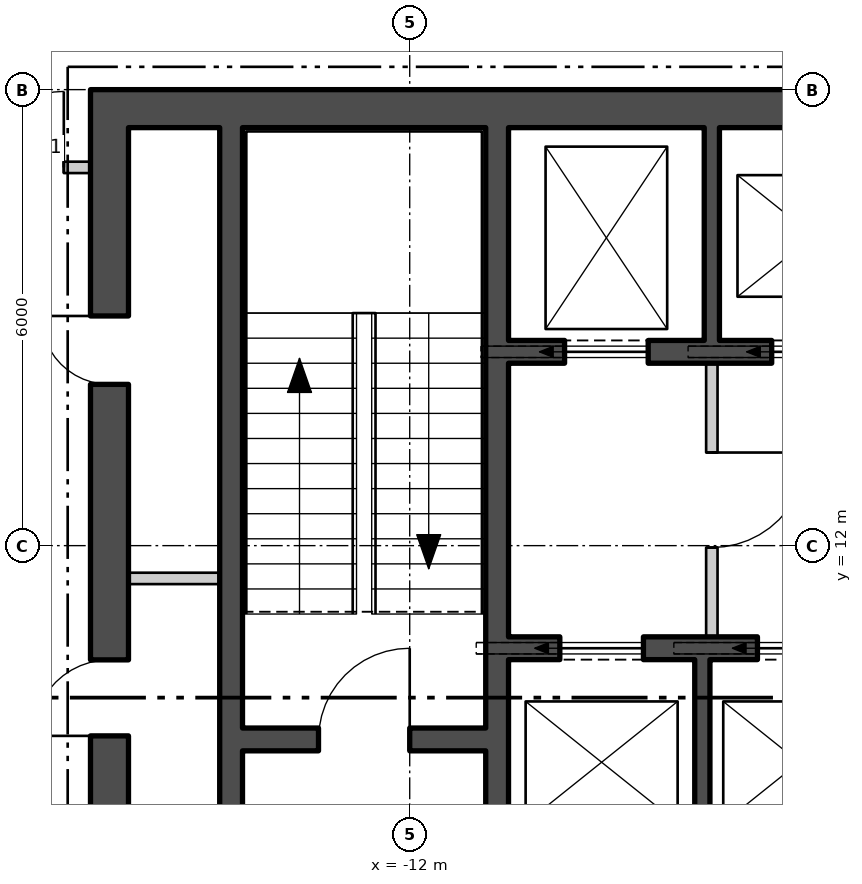
"""IFC4 building model, lengths in metres.
Left out: names, types, materials, properties, quantities, classifications, styles, units other than length and angle.
Written with IfcOpenShell. Run it as: python <this file> out.ifc"""

import sys

from ifc_helpers import new_model, si_unit, direction, frame, frame_2d, origin, place, context, subcontext, project, spatial, polyline, rectangle, outline, extrude, element, fill, save


model = new_model("IFC4")
c1 = context("Model", 3, precision=1e-05, world=origin(), true_north=direction((0.0, 1.0)))
c2 = subcontext(c1, "Body", "Model", "MODEL_VIEW")
j1 = project(units=[si_unit("LENGTHUNIT", "METRE"), si_unit("PLANEANGLEUNIT", "RADIAN")], contexts=[c1])
p1 = place(None, origin())
s1 = spatial("IfcSite", under=j1, at=p1, CompositionType="ELEMENT")
p2 = place(p1, origin())
s2 = spatial("IfcBuilding", under=s1, at=p2, CompositionType="ELEMENT")
p3 = place(p2, frame((0.0, 0.0, 151.5)))
s3 = spatial("IfcBuildingStorey", under=s2, at=p3, CompositionType="ELEMENT", Elevation=151.5)
p4 = place(p3, frame((-27.075, 12.683, -0.18), z_axis=(0.0, 0.0, 1.0), x_axis=(0.500000141277, -0.866025322218, 0.0)))
e1 = element("IfcWall", 1, at=p4, inside=s3, PredefinedType="SOLIDWALL", context=c2, shape_type="SweptSolid", body=[
    extrude(outline(polyline([(-0.13, -0.225), (45.86, -0.225), (45.6, 0.225), (0.13, 0.225), (-0.13, -0.225)])), origin(), (0.0, 0.0, 1.0), 3.68),
])
p5 = place(p4, frame((1.424, 0.0, 1.08)))
e2 = element("IfcOpeningElement", 2, at=p5, cuts=e1, PredefinedType="OPENING", context=c2, shape_type="SweptSolid", body=[
    extrude(rectangle(XDim=2.4, YDim=2.0, at=frame_2d((1.2, 1.0))), frame((0.0, 0.235, 0.0), z_axis=(0.0, -1.0, 0.0), x_axis=(1.0, 0.0, 0.0)), (0.0, 0.0, 1.0), 0.47),
])
p6 = place(p4, frame((5.892, 0.0, 1.08)))
e3 = element("IfcOpeningElement", 3, at=p6, cuts=e1, PredefinedType="OPENING", context=c2, shape_type="SweptSolid", body=[
    extrude(rectangle(XDim=2.4, YDim=2.0, at=frame_2d((1.2, 1.0))), frame((0.0, 0.235, 0.0), z_axis=(0.0, -1.0, 0.0), x_axis=(1.0, 0.0, 0.0)), (0.0, 0.0, 1.0), 0.47),
])
p7 = place(p4, frame((10.399, 0.0, 1.08)))
e4 = element("IfcOpeningElement", 4, at=p7, cuts=e1, PredefinedType="OPENING", context=c2, shape_type="SweptSolid", body=[
    extrude(rectangle(XDim=2.4, YDim=2.0, at=frame_2d((1.2, 1.0))), frame((0.0, 0.235, 0.0), z_axis=(0.0, -1.0, 0.0), x_axis=(1.0, 0.0, 0.0)), (0.0, 0.0, 1.0), 0.47),
])
p8 = place(p4, frame((14.905, 0.0, 1.08)))
e5 = element("IfcOpeningElement", 5, at=p8, cuts=e1, PredefinedType="OPENING", context=c2, shape_type="SweptSolid", body=[
    extrude(rectangle(XDim=2.4, YDim=2.0, at=frame_2d((1.2, 1.0))), frame((0.0, 0.235, 0.0), z_axis=(0.0, -1.0, 0.0), x_axis=(1.0, 0.0, 0.0)), (0.0, 0.0, 1.0), 0.47),
])
p9 = place(p4, frame((19.412, 0.0, 1.08)))
e6 = element("IfcOpeningElement", 6, at=p9, cuts=e1, PredefinedType="OPENING", context=c2, shape_type="SweptSolid", body=[
    extrude(rectangle(XDim=2.4, YDim=2.0, at=frame_2d((1.2, 1.0))), frame((0.0, 0.235, 0.0), z_axis=(0.0, -1.0, 0.0), x_axis=(1.0, 0.0, 0.0)), (0.0, 0.0, 1.0), 0.47),
])
p10 = place(p4, frame((23.918, 0.0, 1.08)))
e7 = element("IfcOpeningElement", 7, at=p10, cuts=e1, PredefinedType="OPENING", context=c2, shape_type="SweptSolid", body=[
    extrude(rectangle(XDim=2.4, YDim=2.0, at=frame_2d((1.2, 1.0))), frame((0.0, 0.235, 0.0), z_axis=(0.0, -1.0, 0.0), x_axis=(1.0, 0.0, 0.0)), (0.0, 0.0, 1.0), 0.47),
])
p11 = place(p4, frame((28.425, 0.0, 1.08)))
e8 = element("IfcOpeningElement", 8, at=p11, cuts=e1, PredefinedType="OPENING", context=c2, shape_type="SweptSolid", body=[
    extrude(rectangle(XDim=2.4, YDim=2.0, at=frame_2d((1.2, 1.0))), frame((0.0, 0.235, 0.0), z_axis=(0.0, -1.0, 0.0), x_axis=(1.0, 0.0, 0.0)), (0.0, 0.0, 1.0), 0.47),
])
p12 = place(p4, frame((32.932, 0.0, 1.08)))
e9 = element("IfcOpeningElement", 9, at=p12, cuts=e1, PredefinedType="OPENING", context=c2, shape_type="SweptSolid", body=[
    extrude(rectangle(XDim=2.4, YDim=2.0, at=frame_2d((1.2, 1.0))), frame((0.0, 0.235, 0.0), z_axis=(0.0, -1.0, 0.0), x_axis=(1.0, 0.0, 0.0)), (0.0, 0.0, 1.0), 0.47),
])
p13 = place(p4, frame((37.438, 0.0, 1.08)))
e10 = element("IfcOpeningElement", 10, at=p13, cuts=e1, PredefinedType="OPENING", context=c2, shape_type="SweptSolid", body=[
    extrude(rectangle(XDim=2.4, YDim=2.0, at=frame_2d((1.2, 1.0))), frame((0.0, 0.235, 0.0), z_axis=(0.0, -1.0, 0.0), x_axis=(1.0, 0.0, 0.0)), (0.0, 0.0, 1.0), 0.47),
])
p14 = place(p4, frame((41.907, 0.0, 1.08)))
e11 = element("IfcOpeningElement", 11, at=p14, cuts=e1, PredefinedType="OPENING", context=c2, shape_type="SweptSolid", body=[
    extrude(rectangle(XDim=2.4, YDim=2.0, at=frame_2d((1.2, 1.0))), frame((0.0, 0.235, 0.0), z_axis=(0.0, -1.0, 0.0), x_axis=(1.0, 0.0, 0.0)), (0.0, 0.0, 1.0), 0.47),
])
p15 = place(p3, frame((-16.2, 17.75, 0.0), z_axis=(0.0, 0.0, 1.0), x_axis=(1.0, 0.0, 0.0)))
e12 = element("IfcWall", 12, at=p15, inside=s3, PredefinedType="SHEAR", context=c2, shape_type="SweptSolid", body=[
    extrude(rectangle(XDim=32.4, YDim=0.5, at=frame_2d((16.2, 0.0))), origin(), (0.0, 0.0, 1.0), 3.7),
])
p16 = place(p3, frame((-15.95, 2.5, 0.0), z_axis=(0.0, 0.0, 1.0), x_axis=(0.0, 1.0, 0.0)))
e13 = element("IfcWall", 13, at=p16, inside=s3, PredefinedType="SHEAR", context=c2, shape_type="SweptSolid", body=[
    extrude(rectangle(XDim=15.0, YDim=0.5, at=frame_2d((7.5, 0.0))), origin(), (0.0, 0.0, 1.0), 3.7),
])
p17 = place(p16, frame((4.35, 0.0, 0.0)))
e14 = element("IfcOpeningElement", 14, at=p17, cuts=e13, PredefinedType="OPENING", context=c2, shape_type="SweptSolid", body=[
    extrude(rectangle(XDim=1.5, YDim=2.1, at=frame_2d((0.75, 1.05))), frame((0.0, 0.26, 0.0), z_axis=(0.0, -1.0, 0.0), x_axis=(1.0, 0.0, 0.0)), (0.0, 0.0, 1.0), 0.52),
])
p18 = place(p16, frame((0.825, 0.0, 0.0)))
e15 = element("IfcOpeningElement", 15, at=p18, cuts=e13, PredefinedType="OPENING", context=c2, shape_type="SweptSolid", body=[
    extrude(rectangle(XDim=0.9, YDim=2.1, at=frame_2d((0.45, 1.05))), frame((0.0, 0.26, 0.0), z_axis=(0.0, -1.0, 0.0), x_axis=(1.0, 0.0, 0.0)), (0.0, 0.0, 1.0), 0.52),
])
p19 = place(p16, frame((3.0, 0.0, 0.0)))
e16 = element("IfcOpeningElement", 16, at=p19, cuts=e13, PredefinedType="OPENING", context=c2, shape_type="SweptSolid", body=[
    extrude(rectangle(XDim=0.9, YDim=2.1, at=frame_2d((0.45, 1.05))), frame((0.0, 0.26, 0.0), z_axis=(0.0, -1.0, 0.0), x_axis=(1.0, 0.0, 0.0)), (0.0, 0.0, 1.0), 0.52),
])
p20 = place(p16, frame((6.997, 0.0, 0.0)))
e17 = element("IfcOpeningElement", 17, at=p20, cuts=e13, PredefinedType="OPENING", context=c2, shape_type="SweptSolid", body=[
    extrude(rectangle(XDim=1.0, YDim=2.1, at=frame_2d((0.5, 1.05))), frame((0.0, 0.26, 0.0), z_axis=(0.0, -1.0, 0.0), x_axis=(1.0, 0.0, 0.0)), (0.0, 0.0, 1.0), 0.52),
])
p21 = place(p16, frame((11.622, 0.0, 0.0)))
e18 = element("IfcOpeningElement", 18, at=p21, cuts=e13, PredefinedType="OPENING", context=c2, shape_type="SweptSolid", body=[
    extrude(rectangle(XDim=0.9, YDim=2.1, at=frame_2d((0.45, 1.05))), frame((0.0, 0.26, 0.0), z_axis=(0.0, -1.0, 0.0), x_axis=(1.0, 0.0, 0.0)), (0.0, 0.0, 1.0), 0.52),
])
p22 = place(p3, frame((-10.85, 2.5, 0.0), z_axis=(0.0, 0.0, 1.0), x_axis=(0.0, 1.0, 0.0)))
e19 = element("IfcWall", 19, at=p22, inside=s3, PredefinedType="SHEAR", context=c2, shape_type="SweptSolid", body=[
    extrude(rectangle(XDim=15.0, YDim=0.3, at=frame_2d((7.5, 0.0))), origin(), (0.0, 0.0, 1.0), 3.7),
])
p23 = place(p22, frame((3.475, 0.0, 0.0)))
e20 = element("IfcOpeningElement", 20, at=p23, cuts=e19, PredefinedType="OPENING", context=c2, shape_type="SweptSolid", body=[
    extrude(rectangle(XDim=1.25, YDim=2.1, at=frame_2d((0.625, 1.05))), frame((0.0, 0.16, 0.0), z_axis=(0.0, -1.0, 0.0), x_axis=(1.0, 0.0, 0.0)), (0.0, 0.0, 1.0), 0.32),
])
p24 = place(p22, frame((1.125, 0.0, 0.0)))
e21 = element("IfcOpeningElement", 21, at=p24, cuts=e19, PredefinedType="OPENING", context=c2, shape_type="SweptSolid", body=[
    extrude(rectangle(XDim=1.0, YDim=2.1, at=frame_2d((0.5, 1.05))), frame((0.0, 0.16, 0.0), z_axis=(0.0, -1.0, 0.0), x_axis=(1.0, 0.0, 0.0)), (0.0, 0.0, 1.0), 0.32),
])
p25 = place(p3, frame((-14.35, 2.5, 0.0), z_axis=(0.0, 0.0, 1.0), x_axis=(0.0, 1.0, 0.0)))
e22 = element("IfcWall", 22, at=p25, inside=s3, PredefinedType="SHEAR", context=c2, shape_type="SweptSolid", body=[
    extrude(rectangle(XDim=15.0, YDim=0.3, at=frame_2d((7.5, 0.0))), origin(), (0.0, 0.0, 1.0), 3.7),
])
p26 = place(p25, frame((4.35, 0.0, 0.0)))
e23 = element("IfcOpeningElement", 23, at=p26, cuts=e22, PredefinedType="OPENING", context=c2, shape_type="SweptSolid", body=[
    extrude(rectangle(XDim=1.5, YDim=2.1, at=frame_2d((0.75, 1.05))), frame((0.0, 0.16, 0.0), z_axis=(0.0, -1.0, 0.0), x_axis=(1.0, 0.0, 0.0)), (0.0, 0.0, 1.0), 0.32),
])
p27 = place(p3, frame((-14.2, 9.45, 0.0), z_axis=(0.0, 0.0, 1.0), x_axis=(1.0, 0.0, 0.0)))
e24 = element("IfcWall", 24, at=p27, inside=s3, PredefinedType="SHEAR", context=c2, shape_type="SweptSolid", body=[
    extrude(rectangle(XDim=3.2, YDim=0.3, at=frame_2d((1.6, 0.0))), origin(), (0.0, 0.0, 1.0), 3.7),
])
p28 = place(p27, frame((1.0, 0.0, 0.0)))
e25 = element("IfcOpeningElement", 25, at=p28, cuts=e24, PredefinedType="OPENING", context=c2, shape_type="SweptSolid", body=[
    extrude(rectangle(XDim=1.2, YDim=2.1, at=frame_2d((0.6, 1.05))), frame((0.0, 0.16, 0.0), z_axis=(0.0, -1.0, 0.0), x_axis=(1.0, 0.0, 0.0)), (0.0, 0.0, 1.0), 0.32),
])
p29 = place(p3, frame((-10.7, 14.55, 0.0), z_axis=(0.0, 0.0, 1.0), x_axis=(1.0, 0.0, 0.0)))
e26 = element("IfcWall", 26, at=p29, inside=s3, PredefinedType="SHEAR", context=c2, shape_type="SweptSolid", body=[
    extrude(rectangle(XDim=21.4, YDim=0.3, at=frame_2d((10.7, 0.0))), origin(), (0.0, 0.0, 1.0), 3.7),
])
p30 = place(p29, frame((0.738, 0.0, 0.0)))
e27 = element("IfcOpeningElement", 27, at=p30, cuts=e26, PredefinedType="OPENING", context=c2, shape_type="SweptSolid", body=[
    extrude(rectangle(XDim=1.1, YDim=2.1, at=frame_2d((0.55, 1.05))), frame((0.0, 0.16, 0.0), z_axis=(0.0, -1.0, 0.0), x_axis=(1.0, 0.0, 0.0)), (0.0, 0.0, 1.0), 0.32),
])
p31 = place(p29, frame((3.462, 0.0, 0.0)))
e28 = element("IfcOpeningElement", 28, at=p31, cuts=e26, PredefinedType="OPENING", context=c2, shape_type="SweptSolid", body=[
    extrude(rectangle(XDim=1.1, YDim=2.1, at=frame_2d((0.55, 1.05))), frame((0.0, 0.16, 0.0), z_axis=(0.0, -1.0, 0.0), x_axis=(1.0, 0.0, 0.0)), (0.0, 0.0, 1.0), 0.32),
])
p32 = place(p29, frame((6.138, 0.0, 0.0)))
e29 = element("IfcOpeningElement", 29, at=p32, cuts=e26, PredefinedType="OPENING", context=c2, shape_type="SweptSolid", body=[
    extrude(rectangle(XDim=1.1, YDim=2.1, at=frame_2d((0.55, 1.05))), frame((0.0, 0.16, 0.0), z_axis=(0.0, -1.0, 0.0), x_axis=(1.0, 0.0, 0.0)), (0.0, 0.0, 1.0), 0.32),
])
p33 = place(p29, frame((8.812, 0.0, 0.0)))
e30 = element("IfcOpeningElement", 30, at=p33, cuts=e26, PredefinedType="OPENING", context=c2, shape_type="SweptSolid", body=[
    extrude(rectangle(XDim=1.1, YDim=2.1, at=frame_2d((0.55, 1.05))), frame((0.0, 0.16, 0.0), z_axis=(0.0, -1.0, 0.0), x_axis=(1.0, 0.0, 0.0)), (0.0, 0.0, 1.0), 0.32),
])
p34 = place(p29, frame((19.562, 0.0, 0.0)))
e31 = element("IfcOpeningElement", 31, at=p34, cuts=e26, PredefinedType="OPENING", context=c2, shape_type="SweptSolid", body=[
    extrude(rectangle(XDim=1.1, YDim=2.1, at=frame_2d((0.55, 1.05))), frame((0.0, 0.16, 0.0), z_axis=(0.0, -1.0, 0.0), x_axis=(1.0, 0.0, 0.0)), (0.0, 0.0, 1.0), 0.32),
])
p35 = place(p29, frame((14.213, 0.0, 0.0)))
e32 = element("IfcOpeningElement", 32, at=p35, cuts=e26, PredefinedType="OPENING", context=c2, shape_type="SweptSolid", body=[
    extrude(rectangle(XDim=1.0, YDim=2.1, at=frame_2d((0.5, 1.05))), frame((0.0, 0.16, 0.0), z_axis=(0.0, -1.0, 0.0), x_axis=(1.0, 0.0, 0.0)), (0.0, 0.0, 1.0), 0.32),
])
p36 = place(p3, frame((-10.7, 10.65, 0.0), z_axis=(0.0, 0.0, 1.0), x_axis=(1.0, 0.0, 0.0)))
e33 = element("IfcWall", 33, at=p36, inside=s3, PredefinedType="SHEAR", context=c2, shape_type="SweptSolid", body=[
    extrude(rectangle(XDim=10.3, YDim=0.3, at=frame_2d((5.15, 0.0))), origin(), (0.0, 0.0, 1.0), 3.7),
])
p37 = place(p36, frame((0.675, 0.0, 0.0)))
e34 = element("IfcOpeningElement", 34, at=p37, cuts=e33, PredefinedType="OPENING", context=c2, shape_type="SweptSolid", body=[
    extrude(rectangle(XDim=1.1, YDim=2.1, at=frame_2d((0.55, 1.05))), frame((0.0, 0.16, 0.0), z_axis=(0.0, -1.0, 0.0), x_axis=(1.0, 0.0, 0.0)), (0.0, 0.0, 1.0), 0.32),
])
p38 = place(p36, frame((3.275, 0.0, 0.0)))
e35 = element("IfcOpeningElement", 35, at=p38, cuts=e33, PredefinedType="OPENING", context=c2, shape_type="SweptSolid", body=[
    extrude(rectangle(XDim=1.1, YDim=2.1, at=frame_2d((0.55, 1.05))), frame((0.0, 0.16, 0.0), z_axis=(0.0, -1.0, 0.0), x_axis=(1.0, 0.0, 0.0)), (0.0, 0.0, 1.0), 0.32),
])
p39 = place(p36, frame((5.825, 0.0, 0.0)))
e36 = element("IfcOpeningElement", 36, at=p39, cuts=e33, PredefinedType="OPENING", context=c2, shape_type="SweptSolid", body=[
    extrude(rectangle(XDim=1.1, YDim=2.1, at=frame_2d((0.55, 1.05))), frame((0.0, 0.16, 0.0), z_axis=(0.0, -1.0, 0.0), x_axis=(1.0, 0.0, 0.0)), (0.0, 0.0, 1.0), 0.32),
])
p40 = place(p36, frame((8.425, 0.0, 0.0)))
e37 = element("IfcOpeningElement", 37, at=p40, cuts=e33, PredefinedType="OPENING", context=c2, shape_type="SweptSolid", body=[
    extrude(rectangle(XDim=1.0, YDim=2.1, at=frame_2d((0.5, 1.05))), frame((0.0, 0.16, 0.0), z_axis=(0.0, -1.0, 0.0), x_axis=(1.0, 0.0, 0.0)), (0.0, 0.0, 1.0), 0.32),
])
p41 = place(p3, frame((-8.025, 14.7, 0.0), z_axis=(0.0, 0.0, 1.0), x_axis=(0.0, 1.0, 0.0)))
e38 = element("IfcWall", 38, at=p41, inside=s3, PredefinedType="SHEAR", context=c2, shape_type="SweptSolid", body=[
    extrude(rectangle(XDim=2.8, YDim=0.2, at=frame_2d((1.4, 0.0))), origin(), (0.0, 0.0, 1.0), 3.7),
])
p42 = place(p3, frame((-8.15, 7.8, 0.0), z_axis=(0.0, 0.0, 1.0), x_axis=(0.0, 1.0, 0.0)))
e39 = element("IfcWall", 39, at=p42, inside=s3, PredefinedType="SHEAR", context=c2, shape_type="SweptSolid", body=[
    extrude(rectangle(XDim=2.7, YDim=0.2, at=frame_2d((1.35, 0.0))), origin(), (0.0, 0.0, 1.0), 3.7),
])
p43 = place(p3, frame((-8.025, 10.8, 0.0), z_axis=(0.0, 0.0, 1.0), x_axis=(0.0, 1.0, 0.0)))
e40 = element("IfcWall", 40, at=p43, inside=s3, PredefinedType="PARTITIONING", context=c2, shape_type="SweptSolid", body=[
    extrude(rectangle(XDim=3.6, YDim=0.15, at=frame_2d((1.8, 0.0))), origin(), (0.0, 0.0, 1.0), 3.7),
])
p44 = place(p43, frame((1.175, 0.0, 0.0)))
e41 = element("IfcOpeningElement", 41, at=p44, cuts=e40, PredefinedType="OPENING", context=c2, shape_type="SweptSolid", body=[
    extrude(rectangle(XDim=1.25, YDim=2.1, at=frame_2d((0.625, 1.05))), frame((0.0, 0.085, 0.0), z_axis=(0.0, -1.0, 0.0), x_axis=(1.0, 0.0, 0.0)), (0.0, 0.0, 1.0), 0.17),
])
p45 = place(p3, frame((-15.7, 11.569, 0.0), z_axis=(0.0, 0.0, 1.0), x_axis=(1.0, 0.0, 0.0)))
e42 = element("IfcWall", 42, at=p45, inside=s3, PredefinedType="PARTITIONING", context=c2, shape_type="SweptSolid", body=[
    extrude(rectangle(XDim=1.2, YDim=0.15, at=frame_2d((0.6, 0.0))), origin(), (0.0, 0.0, 1.0), 3.7),
])
p46 = place(p3, frame((-17.952, 16.977, 0.0), z_axis=(0.0, 0.0, 1.0), x_axis=(1.0, 0.0, 0.0)))
e43 = element("IfcWall", 43, at=p46, inside=s3, PredefinedType="PARTITIONING", context=c2, shape_type="SweptSolid", body=[
    extrude(rectangle(XDim=1.752, YDim=0.15, at=frame_2d((0.876, 0.0))), origin(), (0.0, 0.0, 1.0), 3.7),
])
p47 = place(p46, frame((0.401, 0.0, 0.0)))
e44 = element("IfcOpeningElement", 44, at=p47, cuts=e43, PredefinedType="OPENING", context=c2, shape_type="SweptSolid", body=[
    extrude(rectangle(XDim=1.0, YDim=2.1, at=frame_2d((0.5, 1.05))), frame((0.0, 0.085, 0.0), z_axis=(0.0, -1.0, 0.0), x_axis=(1.0, 0.0, 0.0)), (0.0, 0.0, 1.0), 0.17),
])
p48 = place(p30, origin())
e45 = element("IfcDoor", 45, at=p48, inside=s3, OperationType="SLIDING_TO_LEFT", PredefinedType="DOOR", context=c2, shape_type="SweptSolid", body=[
    extrude(rectangle(XDim=1.1, YDim=2.1, at=frame_2d((0.55, 1.05))), frame((0.0, 0.025, 0.0), z_axis=(0.0, -1.0, 0.0), x_axis=(1.0, 0.0, 0.0)), (0.0, 0.0, 1.0), 0.05),
])
fill(e27, e45)
p49 = place(p31, origin())
e46 = element("IfcDoor", 46, at=p49, inside=s3, OperationType="SLIDING_TO_LEFT", PredefinedType="DOOR", context=c2, shape_type="SweptSolid", body=[
    extrude(rectangle(XDim=1.1, YDim=2.1, at=frame_2d((0.55, 1.05))), frame((0.0, 0.025, 0.0), z_axis=(0.0, -1.0, 0.0), x_axis=(1.0, 0.0, 0.0)), (0.0, 0.0, 1.0), 0.05),
])
fill(e28, e46)
p50 = place(p37, origin())
e47 = element("IfcDoor", 47, at=p50, inside=s3, OperationType="SLIDING_TO_LEFT", PredefinedType="DOOR", context=c2, shape_type="SweptSolid", body=[
    extrude(rectangle(XDim=1.1, YDim=2.1, at=frame_2d((0.55, 1.05))), frame((0.0, 0.025, 0.0), z_axis=(0.0, -1.0, 0.0), x_axis=(1.0, 0.0, 0.0)), (0.0, 0.0, 1.0), 0.05),
])
fill(e34, e47)
p51 = place(p38, origin())
e48 = element("IfcDoor", 48, at=p51, inside=s3, OperationType="SLIDING_TO_LEFT", PredefinedType="DOOR", context=c2, shape_type="SweptSolid", body=[
    extrude(rectangle(XDim=1.1, YDim=2.1, at=frame_2d((0.55, 1.05))), frame((0.0, 0.025, 0.0), z_axis=(0.0, -1.0, 0.0), x_axis=(1.0, 0.0, 0.0)), (0.0, 0.0, 1.0), 0.05),
])
fill(e35, e48)
p52 = place(p44, origin())
e49 = element("IfcDoor", 49, at=p52, inside=s3, OperationType="SINGLE_SWING_RIGHT", PredefinedType="DOOR", context=c2, shape_type="SweptSolid", body=[
    extrude(rectangle(XDim=1.25, YDim=2.1, at=frame_2d((0.625, 1.05))), frame((0.0, 0.025, 0.0), z_axis=(0.0, -1.0, 0.0), x_axis=(1.0, 0.0, 0.0)), (0.0, 0.0, 1.0), 0.05),
])
fill(e41, e49)
p53 = place(p28, origin())
e50 = element("IfcDoor", 50, at=p53, inside=s3, OperationType="SINGLE_SWING_LEFT", PredefinedType="DOOR", context=c2, shape_type="SweptSolid", body=[
    extrude(rectangle(XDim=1.2, YDim=2.1, at=frame_2d((0.6, 1.05))), frame((0.0, 0.025, 0.0), z_axis=(0.0, -1.0, 0.0), x_axis=(1.0, 0.0, 0.0)), (0.0, 0.0, 1.0), 0.05),
])
fill(e25, e50)
p54 = place(p20, origin())
e51 = element("IfcDoor", 51, at=p54, inside=s3, OperationType="SINGLE_SWING_RIGHT", PredefinedType="DOOR", context=c2, shape_type="SweptSolid", body=[
    extrude(rectangle(XDim=1.0, YDim=2.1, at=frame_2d((0.5, 1.05))), frame((0.0, 0.025, 0.0), z_axis=(0.0, -1.0, 0.0), x_axis=(1.0, 0.0, 0.0)), (0.0, 0.0, 1.0), 0.05),
])
fill(e17, e51)
p55 = place(p21, origin())
e52 = element("IfcDoor", 52, at=p55, inside=s3, OperationType="SINGLE_SWING_LEFT", PredefinedType="DOOR", context=c2, shape_type="SweptSolid", body=[
    extrude(rectangle(XDim=0.9, YDim=2.1, at=frame_2d((0.45, 1.05))), frame((0.0, 0.025, 0.0), z_axis=(0.0, -1.0, 0.0), x_axis=(1.0, 0.0, 0.0)), (0.0, 0.0, 1.0), 0.05),
])
fill(e18, e52)
p56 = place(p47, origin())
e53 = element("IfcDoor", 53, at=p56, inside=s3, OperationType="SINGLE_SWING_LEFT", PredefinedType="DOOR", context=c2, shape_type="SweptSolid", body=[
    extrude(rectangle(XDim=1.0, YDim=2.1, at=frame_2d((0.5, 1.05))), frame((0.0, 0.025, 0.0), z_axis=(0.0, -1.0, 0.0), x_axis=(1.0, 0.0, 0.0)), (0.0, 0.0, 1.0), 0.05),
])
fill(e44, e53)
save(model, sys.argv[1])
